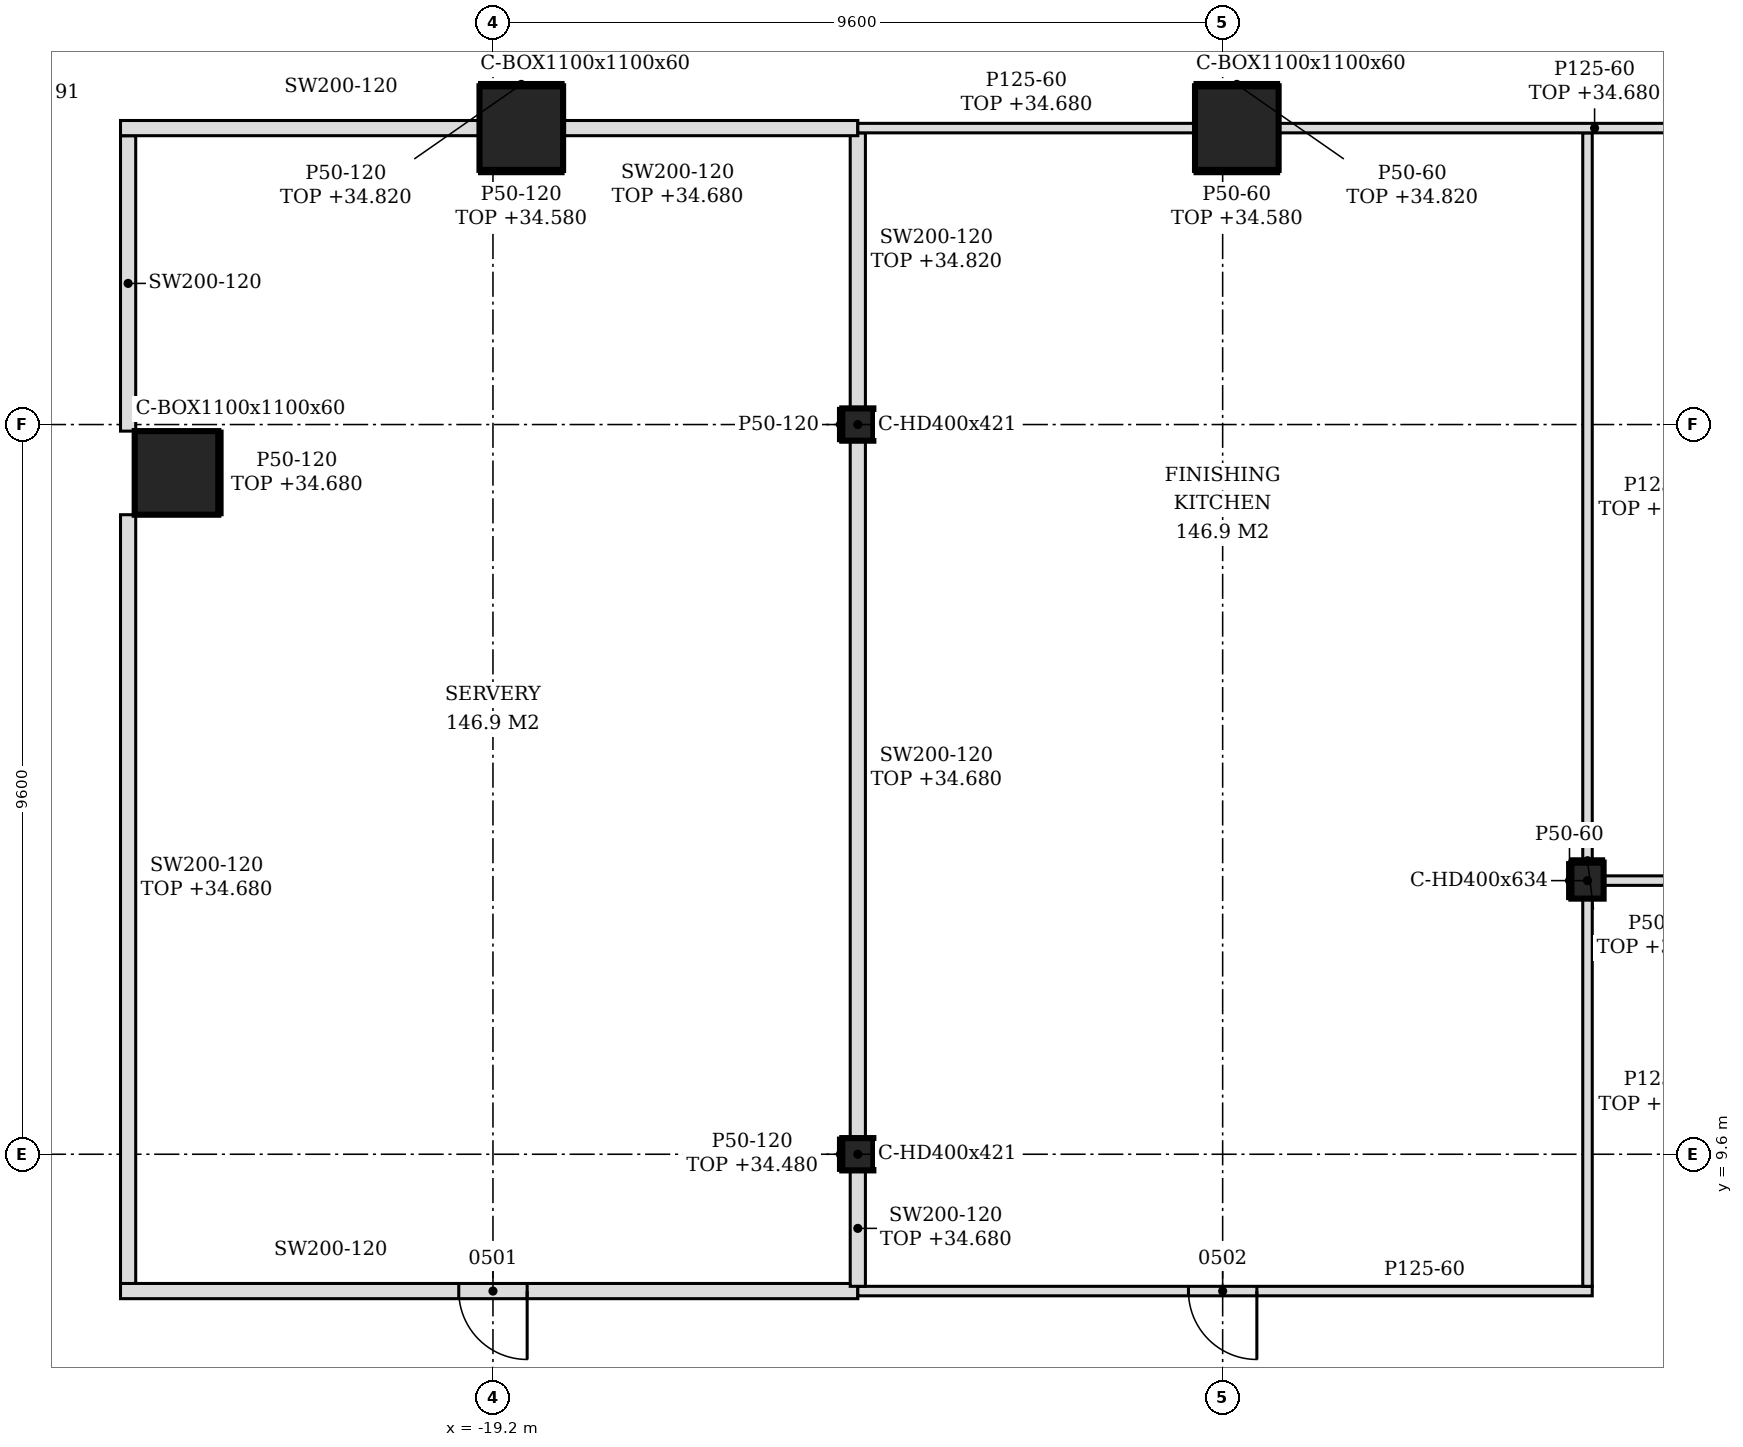
"""IFC4 building model, lengths in metres.
Left out: names, types, materials, properties, quantities, classifications, styles, units other than length and angle.
Written with IfcOpenShell. Run it as: python <this file> out.ifc"""

import sys

from ifc_helpers import new_model, si_unit, direction, frame, frame_2d, origin, origin_2d, place, context, subcontext, project, spatial, polyline, rectangle, hollow_rectangle, i_section, outline, extrude, element, fill, save


model = new_model("IFC4")
c1 = context("Model", 3, precision=1e-05, world=origin(), true_north=direction((0.0, 1.0)))
c2 = subcontext(c1, "Body", "Model", "MODEL_VIEW")
j1 = project(units=[si_unit("LENGTHUNIT", "METRE"), si_unit("PLANEANGLEUNIT", "RADIAN")], contexts=[c1])
p1 = place(None, origin())
s1 = spatial("IfcSite", under=j1, at=p1, CompositionType="ELEMENT")
p2 = place(p1, origin())
s2 = spatial("IfcBuilding", under=s1, at=p2, CompositionType="ELEMENT")
p3 = place(p2, frame((0.0, 0.0, 30.6)))
s3 = spatial("IfcBuildingStorey", under=s2, at=p3, CompositionType="ELEMENT", Elevation=30.6)
for number, where, z_axis, x_axis in (
    (1, (-9.414, 23.1, -0.2), (0.0, 0.0, 1.0), (1.0, 0.0, 0.0)),
    (2, (-18.827, 23.1, -0.2), (0.0, 0.0, 1.0), (1.0, 0.0, 0.0)),
    (3, (-23.364, 18.564, -0.2), (0.0, 0.0, 1.0), (1.0, 0.0, 0.0)),
):
    element("IfcColumn", number, at=place(p3, frame(where, z_axis=z_axis, x_axis=x_axis)), inside=s3, PredefinedType="COLUMN", context=c2, shape_type="SweptSolid", body=[
        extrude(hollow_rectangle(XDim=1.1, YDim=1.1, WallThickness=0.06, at=origin_2d()), origin(), (0.0, 0.0, 1.0), 4.8),
    ])
p4 = place(p3, frame((-4.8, 13.2, -0.2), z_axis=(0.0, 0.0, 1.0), x_axis=(1.0, 0.0, 0.0)))
e4 = element("IfcColumn", 4, at=p4, inside=s3, PredefinedType="COLUMN", context=c2, shape_type="SweptSolid", body=[
    extrude(i_section(OverallWidth=0.424, OverallDepth=0.474, WebThickness=0.048, FlangeThickness=0.077, FilletRadius=0.015, at=origin_2d()), origin(), (0.0, 0.0, 1.0), 4.8),
])
for number, where, z_axis, x_axis in (
    (5, (-14.4, 9.6, -0.2), (0.0, 0.0, 1.0), (1.0, 0.0, 0.0)),
    (6, (-14.4, 19.2, -0.2), (0.0, 0.0, 1.0), (1.0, 0.0, 0.0)),
):
    element("IfcColumn", number, at=place(p3, frame(where, z_axis=z_axis, x_axis=x_axis)), inside=s3, PredefinedType="COLUMN", context=c2, shape_type="SweptSolid", body=[
        extrude(i_section(OverallWidth=0.409, OverallDepth=0.425, WebThickness=0.033, FlangeThickness=0.052, FilletRadius=0.015, at=origin_2d()), origin(), (0.0, 0.0, 1.0), 4.8),
    ])
p5 = place(p3, frame((-24.1, 7.8, 0.0), z_axis=(0.0, 0.0, 1.0), x_axis=(1.0, 0.0, 0.0)))
e7 = element("IfcWall", 7, at=p5, inside=s3, PredefinedType="PARTITIONING", context=c2, shape_type="SweptSolid", body=[
    extrude(outline(polyline([(0.0, 0.0), (9.7, 0.0), (9.7, 4.08), (9.6, 4.08), (9.598, 4.6), (5.0, 4.6), (4.998, 4.08), (4.8, 4.08), (4.798, 4.6), (0.2, 4.6), (0.198, 4.08), (0.0, 4.08), (0.0, 0.0)])), frame((0.0, 0.1, 0.0), z_axis=(0.0, -1.0, 0.0), x_axis=(1.0, 0.0, 0.0)), (0.0, 0.0, 1.0), 0.2),
])
p6 = place(p5, frame((4.45, 0.0, 0.0)))
e8 = element("IfcOpeningElement", 8, at=p6, cuts=e7, PredefinedType="OPENING", context=c2, shape_type="SweptSolid", body=[
    extrude(rectangle(XDim=0.9, YDim=2.1, at=frame_2d((0.45, 1.05))), frame((0.0, 0.11, 0.0), z_axis=(0.0, -1.0, 0.0), x_axis=(1.0, 0.0, 0.0)), (0.0, 0.0, 1.0), 0.22),
])
p7 = place(p3, frame((-14.4, 7.8, 0.0), z_axis=(0.0, 0.0, 1.0), x_axis=(1.0, 0.0, 0.0)))
e9 = element("IfcWall", 9, at=p7, inside=s3, PredefinedType="PARTITIONING", context=c2, shape_type="SweptSolid", body=[
    extrude(outline(polyline([(0.0, 0.0), (9.662, 0.0), (9.663, 3.98), (9.45, 3.98), (9.448, 4.6), (4.9, 4.6), (4.898, 4.08), (4.7, 4.08), (4.698, 4.6), (0.1, 4.6), (0.098, 4.08), (0.0, 4.08), (0.0, 0.0)])), frame((0.0, 0.062, 0.0), z_axis=(0.0, -1.0, 0.0), x_axis=(1.0, 0.0, 0.0)), (0.0, 0.0, 1.0), 0.125),
])
p8 = place(p7, frame((4.35, 0.0, 0.0)))
e10 = element("IfcOpeningElement", 10, at=p8, cuts=e9, PredefinedType="OPENING", context=c2, shape_type="SweptSolid", body=[
    extrude(rectangle(XDim=0.9, YDim=2.1, at=frame_2d((0.45, 1.05))), frame((0.0, 0.073, 0.0), z_axis=(0.0, -1.0, 0.0), x_axis=(1.0, 0.0, 0.0)), (0.0, 0.0, 1.0), 0.145),
])
p9 = place(p3, frame((-24.0, 7.9, 0.0), z_axis=(0.0, 0.0, 1.0), x_axis=(0.0, 1.0, 0.0)))
e11 = element("IfcWall", 11, at=p9, inside=s3, PredefinedType="PARTITIONING", context=c2, shape_type="SweptSolid", body=[
    extrude(outline(polyline([(0.0, 0.0), (10.114, 0.0), (10.114, 4.08), (1.85, 4.08), (1.848, 3.88), (1.55, 3.88), (1.548, 4.08), (0.0, 4.08), (0.0, 0.0)])), frame((0.0, 0.1, 0.0), z_axis=(0.0, -1.0, 0.0), x_axis=(1.0, 0.0, 0.0)), (0.0, 0.0, 1.0), 0.2),
])
p10 = place(p3, frame((-14.4, 7.863, 0.0), z_axis=(0.0, 0.0, 1.0), x_axis=(0.0, 1.0, 0.0)))
e12 = element("IfcWall", 12, at=p10, inside=s3, PredefinedType="PARTITIONING", context=c2, shape_type="SweptSolid", body=[
    extrude(rectangle(XDim=1.525, YDim=0.2, at=frame_2d((0.762, 0.0))), origin(), (0.0, 0.0, 1.0), 4.08),
])
p11 = place(p3, frame((-4.8, 7.863, 0.0), z_axis=(0.0, 0.0, 1.0), x_axis=(0.0, 1.0, 0.0)))
e13 = element("IfcWall", 13, at=p11, inside=s3, PredefinedType="PARTITIONING", context=c2, shape_type="SweptSolid", body=[
    extrude(rectangle(XDim=5.1, YDim=0.125, at=frame_2d((2.55, 0.0))), origin(), (0.0, 0.0, 1.0), 3.98),
])
p12 = place(p3, frame((-14.4, 9.812, 0.0), z_axis=(0.0, 0.0, 1.0), x_axis=(0.0, 1.0, 0.0)))
e14 = element("IfcWall", 14, at=p12, inside=s3, PredefinedType="PARTITIONING", context=c2, shape_type="SweptSolid", body=[
    extrude(rectangle(XDim=9.175, YDim=0.2, at=frame_2d((4.587, 0.0))), origin(), (0.0, 0.0, 1.0), 4.08),
])
p13 = place(p3, frame((-4.588, 13.2, 0.0), z_axis=(0.0, 0.0, 1.0), x_axis=(1.0, 0.0, 0.0)))
e15 = element("IfcWall", 15, at=p13, inside=s3, PredefinedType="PARTITIONING", context=c2, shape_type="SweptSolid", body=[
    extrude(rectangle(XDim=11.576, YDim=0.125, at=frame_2d((5.788, 0.0))), origin(), (0.0, 0.0, 1.0), 3.98),
])
p14 = place(p13, frame((4.888, 0.0, 0.0)))
e16 = element("IfcOpeningElement", 16, at=p14, cuts=e15, PredefinedType="OPENING", context=c2, shape_type="SweptSolid", body=[
    extrude(rectangle(XDim=1.8, YDim=2.1, at=frame_2d((0.9, 1.05))), frame((0.0, 0.073, 0.0), z_axis=(0.0, -1.0, 0.0), x_axis=(1.0, 0.0, 0.0)), (0.0, 0.0, 1.0), 0.145),
])
p15 = place(p3, frame((-4.8, 13.437, 0.0), z_axis=(0.0, 0.0, 1.0), x_axis=(0.0, 1.0, 0.0)))
e17 = element("IfcWall", 17, at=p15, inside=s3, PredefinedType="PARTITIONING", context=c2, shape_type="SweptSolid", body=[
    extrude(rectangle(XDim=9.601, YDim=0.125, at=frame_2d((4.8, 0.0))), origin(), (0.0, 0.0, 1.0), 4.08),
])
p16 = place(p3, frame((-24.0, 19.114, 0.0), z_axis=(0.0, 0.0, 1.0), x_axis=(0.0, 1.0, 0.0)))
e18 = element("IfcWall", 18, at=p16, inside=s3, PredefinedType="PARTITIONING", context=c2, shape_type="SweptSolid", body=[
    extrude(outline(polyline([(0.0, 0.0), (3.886, 0.0), (3.886, 4.6), (0.236, 4.6), (0.234, 3.98), (0.0, 3.98), (0.0, 0.0)])), frame((0.0, 0.1, 0.0), z_axis=(0.0, -1.0, 0.0), x_axis=(1.0, 0.0, 0.0)), (0.0, 0.0, 1.0), 0.2),
])
p17 = place(p3, frame((-14.4, 19.413, 0.0), z_axis=(0.0, 0.0, 1.0), x_axis=(0.0, 1.0, 0.0)))
e19 = element("IfcWall", 19, at=p17, inside=s3, PredefinedType="PARTITIONING", context=c2, shape_type="SweptSolid", body=[
    extrude(outline(polyline([(0.0, 0.0), (3.625, 0.0), (3.625, 4.08), (3.538, 4.08), (3.535, 4.22), (0.0, 4.22), (0.0, 0.0)])), frame((0.0, 0.1, 0.0), z_axis=(0.0, -1.0, 0.0), x_axis=(1.0, 0.0, 0.0)), (0.0, 0.0, 1.0), 0.2),
])
p18 = place(p3, frame((-24.1, 23.1, 0.0), z_axis=(0.0, 0.0, 1.0), x_axis=(1.0, 0.0, 0.0)))
e20 = element("IfcWall", 20, at=p18, inside=s3, PredefinedType="PARTITIONING", context=c2, shape_type="SweptSolid", body=[
    extrude(rectangle(XDim=4.723, YDim=0.2, at=frame_2d((2.361, 0.0))), origin(), (0.0, 0.0, 1.0), 4.6),
])
p19 = place(p3, frame((-18.277, 23.1, 0.0), z_axis=(0.0, 0.0, 1.0), x_axis=(1.0, 0.0, 0.0)))
e21 = element("IfcWall", 21, at=p19, inside=s3, PredefinedType="PARTITIONING", context=c2, shape_type="SweptSolid", body=[
    extrude(rectangle(XDim=3.877, YDim=0.2, at=frame_2d((1.938, 0.0))), origin(), (0.0, 0.0, 1.0), 4.08),
])
p20 = place(p3, frame((-14.4, 23.1, 0.0), z_axis=(0.0, 0.0, 1.0), x_axis=(1.0, 0.0, 0.0)))
e22 = element("IfcWall", 22, at=p20, inside=s3, PredefinedType="PARTITIONING", context=c2, shape_type="SweptSolid", body=[
    extrude(rectangle(XDim=4.436, YDim=0.125, at=frame_2d((2.218, 0.0))), origin(), (0.0, 0.0, 1.0), 4.08),
])
p21 = place(p3, frame((-8.864, 23.1, 0.0), z_axis=(0.0, 0.0, 1.0), x_axis=(1.0, 0.0, 0.0)))
e23 = element("IfcWall", 23, at=p21, inside=s3, PredefinedType="PARTITIONING", context=c2, shape_type="SweptSolid", body=[
    extrude(rectangle(XDim=8.313, YDim=0.125, at=frame_2d((4.157, 0.0))), origin(), (0.0, 0.0, 1.0), 4.08),
])
p22 = place(p3, frame((-22.789, 18.014, 0.0), z_axis=(0.0, 0.0, 1.0), x_axis=(0.0, 1.0, 0.0)))
e24 = element("IfcWall", 24, at=p22, inside=s3, PredefinedType="PARTITIONING", context=c2, shape_type="SweptSolid", body=[
    extrude(rectangle(XDim=1.1, YDim=0.05, at=frame_2d((0.55, 0.0))), origin(), (0.0, 0.0, 1.0), 4.08),
])
p23 = place(p3, frame((-14.629, 9.387, 0.0), z_axis=(0.0, 0.0, 1.0), x_axis=(0.0, 1.0, 0.0)))
e25 = element("IfcWall", 25, at=p23, inside=s3, PredefinedType="PARTITIONING", context=c2, shape_type="SweptSolid", body=[
    extrude(rectangle(XDim=0.425, YDim=0.05, at=frame_2d((0.212, 0.0))), origin(), (0.0, 0.0, 1.0), 3.88),
])
p24 = place(p3, frame((-14.629, 18.988, 0.0), z_axis=(0.0, 0.0, 1.0), x_axis=(0.0, 1.0, 0.0)))
e26 = element("IfcWall", 26, at=p24, inside=s3, PredefinedType="PARTITIONING", context=c2, shape_type="SweptSolid", body=[
    extrude(rectangle(XDim=0.425, YDim=0.05, at=frame_2d((0.212, 0.0))), origin(), (0.0, 0.0, 1.0), 4.6),
])
p25 = place(p3, frame((-5.037, 12.963, 0.0), z_axis=(0.0, 0.0, 1.0), x_axis=(0.0, 1.0, 0.0)))
e27 = element("IfcWall", 27, at=p25, inside=s3, PredefinedType="PARTITIONING", context=c2, shape_type="SweptSolid", body=[
    extrude(rectangle(XDim=0.474, YDim=0.05, at=frame_2d((0.237, 0.0))), origin(), (0.0, 0.0, 1.0), 4.6),
])
p26 = place(p3, frame((-5.012, 13.462, 0.0), z_axis=(0.0, 0.0, 1.0), x_axis=(1.0, 0.0, 0.0)))
e28 = element("IfcWall", 28, at=p26, inside=s3, PredefinedType="PARTITIONING", context=c2, shape_type="SweptSolid", body=[
    extrude(rectangle(XDim=0.424, YDim=0.05, at=frame_2d((0.212, 0.0))), origin(), (0.0, 0.0, 1.0), 4.08),
])
p27 = place(p3, frame((-19.377, 22.525, 0.0), z_axis=(0.0, 0.0, 1.0), x_axis=(1.0, 0.0, 0.0)))
e29 = element("IfcWall", 29, at=p27, inside=s3, PredefinedType="PARTITIONING", context=c2, shape_type="SweptSolid", body=[
    extrude(rectangle(XDim=1.1, YDim=0.05, at=frame_2d((0.55, 0.0))), origin(), (0.0, 0.0, 1.0), 3.98),
])
p28 = place(p3, frame((-19.377, 23.675, 0.0), z_axis=(0.0, 0.0, 1.0), x_axis=(1.0, 0.0, 0.0)))
e30 = element("IfcWall", 30, at=p28, inside=s3, PredefinedType="PARTITIONING", context=c2, shape_type="SweptSolid", body=[
    extrude(rectangle(XDim=1.1, YDim=0.05, at=frame_2d((0.55, 0.0))), origin(), (0.0, 0.0, 1.0), 4.22),
])
p29 = place(p3, frame((-9.964, 22.525, 0.0), z_axis=(0.0, 0.0, 1.0), x_axis=(1.0, 0.0, 0.0)))
e31 = element("IfcWall", 31, at=p29, inside=s3, PredefinedType="PARTITIONING", context=c2, shape_type="SweptSolid", body=[
    extrude(rectangle(XDim=1.1, YDim=0.05, at=frame_2d((0.55, 0.0))), origin(), (0.0, 0.0, 1.0), 3.98),
])
p30 = place(p3, frame((-9.964, 23.675, 0.0), z_axis=(0.0, 0.0, 1.0), x_axis=(1.0, 0.0, 0.0)))
e32 = element("IfcWall", 32, at=p30, inside=s3, PredefinedType="PARTITIONING", context=c2, shape_type="SweptSolid", body=[
    extrude(rectangle(XDim=1.1, YDim=0.05, at=frame_2d((0.55, 0.0))), origin(), (0.0, 0.0, 1.0), 4.22),
])
p31 = place(p6, frame((0.9, 0.0, 0.0), z_axis=(0.0, 0.0, 1.0), x_axis=(-1.0, 0.0, 0.0)))
e33 = element("IfcDoor", 33, at=p31, inside=s3, OperationType="SINGLE_SWING_LEFT", PredefinedType="DOOR", context=c2, shape_type="SweptSolid", body=[
    extrude(rectangle(XDim=0.9, YDim=2.1, at=frame_2d((0.45, 1.05))), frame((0.0, 0.025, 0.0), z_axis=(0.0, -1.0, 0.0), x_axis=(1.0, 0.0, 0.0)), (0.0, 0.0, 1.0), 0.05),
])
fill(e8, e33)
p32 = place(p8, frame((0.9, 0.0, 0.0), z_axis=(0.0, 0.0, 1.0), x_axis=(-1.0, 0.0, 0.0)))
e34 = element("IfcDoor", 34, at=p32, inside=s3, OperationType="SINGLE_SWING_LEFT", PredefinedType="DOOR", context=c2, shape_type="SweptSolid", body=[
    extrude(rectangle(XDim=0.9, YDim=2.1, at=frame_2d((0.45, 1.05))), frame((0.0, 0.025, 0.0), z_axis=(0.0, -1.0, 0.0), x_axis=(1.0, 0.0, 0.0)), (0.0, 0.0, 1.0), 0.05),
])
fill(e10, e34)
save(model, sys.argv[1])
